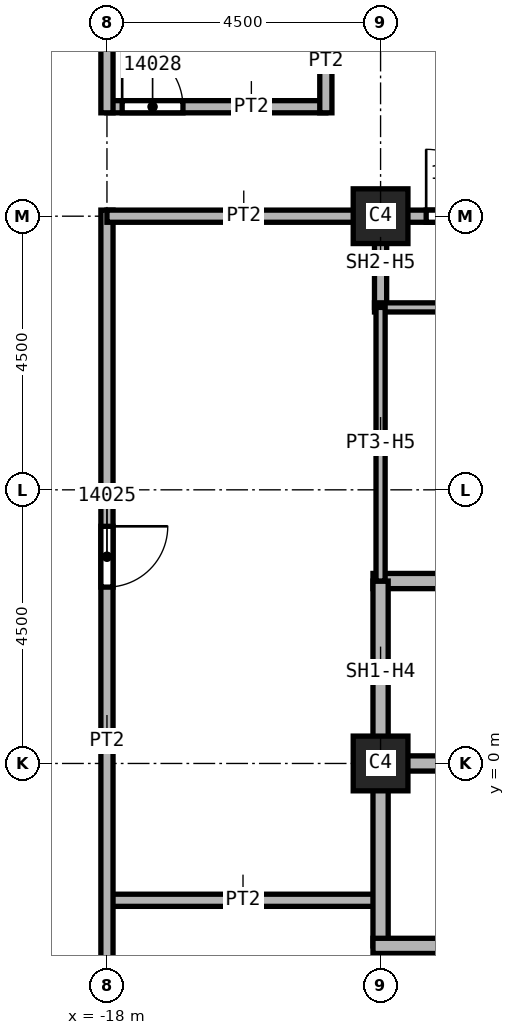
"""IFC4 building model, lengths in metres.
Left out: names, types, materials, properties, quantities, classifications, styles, units other than length and angle.
Written with IfcOpenShell. Run it as: python <this file> out.ifc"""

import sys

from ifc_helpers import new_model, si_unit, direction, frame, frame_2d, origin, origin_2d, place, context, subcontext, project, spatial, rectangle, extrude, element, fill, save


model = new_model("IFC4")
c1 = context("Model", 3, precision=1e-05, world=origin(), true_north=direction((0.0, 1.0)))
c2 = subcontext(c1, "Body", "Model", "MODEL_VIEW")
j1 = project(units=[si_unit("LENGTHUNIT", "METRE"), si_unit("PLANEANGLEUNIT", "RADIAN")], contexts=[c1])
p1 = place(None, origin())
s1 = spatial("IfcSite", under=j1, at=p1, CompositionType="ELEMENT")
p2 = place(p1, origin())
s2 = spatial("IfcBuilding", under=s1, at=p2, CompositionType="ELEMENT")
p3 = place(p2, frame((0.0, 0.0, 220.0)))
s3 = spatial("IfcBuildingStorey", under=s2, at=p3, CompositionType="ELEMENT", Elevation=220.0)
for number, where, z_axis, x_axis in (
    (1, (-13.5, 0.0, 0.0), (0.0, 0.0, 1.0), (1.0, 0.0, 0.0)),
    (2, (-13.5, 9.0, 0.0), (0.0, 0.0, 1.0), (1.0, 0.0, 0.0)),
):
    element("IfcColumn", number, at=place(p3, frame(where, z_axis=z_axis, x_axis=x_axis)), inside=s3, PredefinedType="COLUMN", context=c2, shape_type="SweptSolid", body=[
        extrude(rectangle(XDim=0.9, YDim=0.9, at=origin_2d()), origin(), (0.0, 0.0, 1.0), 3.72),
    ])
p4 = place(p3, frame((-18.0, -2.25, 0.0), z_axis=(0.0, 0.0, 1.0), x_axis=(1.0, 0.0, 0.0)))
e3 = element("IfcWall", 3, at=p4, inside=s3, PredefinedType="PARTITIONING", context=c2, shape_type="SweptSolid", body=[
    extrude(rectangle(XDim=4.5, YDim=0.2, at=frame_2d((2.25, 0.0))), origin(), (0.0, 0.0, 1.0), 3.72),
])
p5 = place(p3, frame((-18.0, 9.1, 0.0), z_axis=(0.0, 0.0, 1.0), x_axis=(0.0, -1.0, 0.0)))
e4 = element("IfcWall", 4, at=p5, inside=s3, PredefinedType="PARTITIONING", context=c2, shape_type="SweptSolid", body=[
    extrude(rectangle(XDim=18.2, YDim=0.2, at=frame_2d((9.1, 0.0))), origin(), (0.0, 0.0, 1.0), 3.72),
])
p6 = place(p5, frame((15.1, 0.0, 0.0)))
e5 = element("IfcOpeningElement", 5, at=p6, cuts=e4, PredefinedType="OPENING", context=c2, shape_type="SweptSolid", body=[
    extrude(rectangle(XDim=1.0, YDim=2.1, at=frame_2d((0.5, 1.05))), frame((0.0, 0.1, 0.0), z_axis=(0.0, -1.0, 0.0), x_axis=(1.0, 0.0, 0.0)), (0.0, 0.0, 1.0), 0.2),
])
p7 = place(p5, frame((5.2, 0.0, 0.0)))
e6 = element("IfcOpeningElement", 6, at=p7, cuts=e4, PredefinedType="OPENING", context=c2, shape_type="SweptSolid", body=[
    extrude(rectangle(XDim=1.0, YDim=2.1, at=frame_2d((0.5, 1.05))), frame((0.0, 0.1, 0.0), z_axis=(0.0, -1.0, 0.0), x_axis=(1.0, 0.0, 0.0)), (0.0, 0.0, 1.0), 0.2),
])
p8 = place(p3, frame((-18.0, 10.8, 0.0), z_axis=(0.0, 0.0, 1.0), x_axis=(1.0, 0.0, 0.0)))
e7 = element("IfcWall", 7, at=p8, inside=s3, PredefinedType="PARTITIONING", context=c2, shape_type="SweptSolid", body=[
    extrude(rectangle(XDim=3.6, YDim=0.2, at=frame_2d((1.8, 0.0))), origin(), (0.0, 0.0, 1.0), 3.72),
])
p9 = place(p8, frame((0.25, 0.0, 0.0)))
e8 = element("IfcOpeningElement", 8, at=p9, cuts=e7, PredefinedType="OPENING", context=c2, shape_type="SweptSolid", body=[
    extrude(rectangle(XDim=1.0, YDim=2.1, at=frame_2d((0.5, 1.05))), frame((0.0, 0.1, 0.0), z_axis=(0.0, -1.0, 0.0), x_axis=(1.0, 0.0, 0.0)), (0.0, 0.0, 1.0), 0.2),
])
p10 = place(p3, frame((-18.0, 13.6, 0.0), z_axis=(0.0, 0.0, 1.0), x_axis=(0.0, -1.0, 0.0)))
e9 = element("IfcWall", 9, at=p10, inside=s3, PredefinedType="PARTITIONING", context=c2, shape_type="SweptSolid", body=[
    extrude(rectangle(XDim=2.9, YDim=0.2, at=frame_2d((1.45, 0.0))), origin(), (0.0, 0.0, 1.0), 3.72),
])
p11 = place(p3, frame((-13.5, 9.0, 0.0), z_axis=(0.0, 0.0, 1.0), x_axis=(-1.0, 0.0, 0.0)))
e10 = element("IfcWall", 10, at=p11, inside=s3, PredefinedType="PARTITIONING", context=c2, shape_type="SweptSolid", body=[
    extrude(rectangle(XDim=4.5, YDim=0.2, at=frame_2d((2.25, 0.0))), origin(), (0.0, 0.0, 1.0), 3.72),
])
p12 = place(p3, frame((-14.4, 10.7, 0.0), z_axis=(0.0, 0.0, 1.0), x_axis=(0.0, 1.0, 0.0)))
e11 = element("IfcWall", 11, at=p12, inside=s3, PredefinedType="PARTITIONING", context=c2, shape_type="SweptSolid", body=[
    extrude(rectangle(XDim=1.6, YDim=0.2, at=frame_2d((0.8, 0.0))), origin(), (0.0, 0.0, 1.0), 3.72),
])
p13 = place(p3, frame((-13.6, 9.0, 0.0), z_axis=(0.0, 0.0, 1.0), x_axis=(1.0, 0.0, 0.0)))
e12 = element("IfcWall", 12, at=p13, inside=s3, PredefinedType="SOLIDWALL", context=c2, shape_type="SweptSolid", body=[
    extrude(rectangle(XDim=3.1, YDim=0.2, at=frame_2d((1.55, 0.0))), origin(), (0.0, 0.0, 1.0), 2.958),
])
p14 = place(p13, frame((0.85, 0.0, 0.0)))
e13 = element("IfcOpeningElement", 13, at=p14, cuts=e12, PredefinedType="OPENING", context=c2, shape_type="SweptSolid", body=[
    extrude(rectangle(XDim=1.1, YDim=2.1, at=frame_2d((0.55, 1.05))), frame((0.0, 0.1, 0.0), z_axis=(0.0, -1.0, 0.0), x_axis=(1.0, 0.0, 0.0)), (0.0, 0.0, 1.0), 0.2),
])
p15 = place(p3, frame((-13.5, -4.5, 0.0), z_axis=(0.0, 0.0, 1.0), x_axis=(0.0, 1.0, 0.0)))
e14 = element("IfcWall", 14, at=p15, inside=s3, PredefinedType="SOLIDWALL", context=c2, shape_type="SweptSolid", body=[
    extrude(rectangle(XDim=1.5, YDim=0.2, at=frame_2d((0.75, 0.0))), origin(), (0.0, 0.0, 1.0), 2.958),
])
p16 = place(p3, frame((-13.5, 7.5, 0.0), z_axis=(0.0, 0.0, 1.0), x_axis=(0.0, 1.0, 0.0)))
e15 = element("IfcWall", 15, at=p16, inside=s3, PredefinedType="SOLIDWALL", context=c2, shape_type="SweptSolid", body=[
    extrude(rectangle(XDim=1.6, YDim=0.2, at=frame_2d((0.8, 0.0))), origin(), (0.0, 0.0, 1.0), 2.958),
])
p17 = place(p3, frame((-13.625, 0.0, 0.0), z_axis=(0.0, 0.0, 1.0), x_axis=(1.0, 0.0, 0.0)))
e16 = element("IfcWall", 16, at=p17, inside=s3, PredefinedType="SOLIDWALL", context=c2, shape_type="SweptSolid", body=[
    extrude(rectangle(XDim=3.125, YDim=0.25, at=frame_2d((1.562, 0.0))), origin(), (0.0, 0.0, 1.0), 3.72),
])
p18 = place(p3, frame((-13.625, 3.0, 0.0), z_axis=(0.0, 0.0, 1.0), x_axis=(1.0, 0.0, 0.0)))
e17 = element("IfcWall", 17, at=p18, inside=s3, PredefinedType="SOLIDWALL", context=c2, shape_type="SweptSolid", body=[
    extrude(rectangle(XDim=9.25, YDim=0.25, at=frame_2d((4.625, 0.0))), origin(), (0.0, 0.0, 1.0), 3.72),
])
p19 = place(p18, frame((3.25, 0.0, 0.0)))
e18 = element("IfcOpeningElement", 18, at=p19, cuts=e17, PredefinedType="OPENING", context=c2, shape_type="SweptSolid", body=[
    extrude(rectangle(XDim=1.1, YDim=2.1, at=frame_2d((0.55, 1.05))), frame((0.0, 0.125, 0.0), z_axis=(0.0, -1.0, 0.0), x_axis=(1.0, 0.0, 0.0)), (0.0, 0.0, 1.0), 0.25),
])
p20 = place(p3, frame((-13.5, -3.0, 0.0), z_axis=(0.0, 0.0, 1.0), x_axis=(0.0, 1.0, 0.0)))
e19 = element("IfcWall", 19, at=p20, inside=s3, PredefinedType="SOLIDWALL", context=c2, shape_type="SweptSolid", body=[
    extrude(rectangle(XDim=6.0, YDim=0.25, at=frame_2d((3.0, 0.0))), origin(), (0.0, 0.0, 1.0), 2.958),
])
p21 = place(p3, frame((-13.625, -3.0, 0.0), z_axis=(0.0, 0.0, 1.0), x_axis=(1.0, 0.0, 0.0)))
e20 = element("IfcWall", 20, at=p21, inside=s3, PredefinedType="SOLIDWALL", context=c2, shape_type="SweptSolid", body=[
    extrude(rectangle(XDim=6.125, YDim=0.25, at=frame_2d((3.062, 0.0))), origin(), (0.0, 0.0, 1.0), 3.72),
])
p22 = place(p21, frame((3.25, 0.0, 0.0)))
e21 = element("IfcOpeningElement", 21, at=p22, cuts=e20, PredefinedType="OPENING", context=c2, shape_type="SweptSolid", body=[
    extrude(rectangle(XDim=1.1, YDim=2.1, at=frame_2d((0.55, 1.05))), frame((0.0, 0.125, 0.0), z_axis=(0.0, -1.0, 0.0), x_axis=(1.0, 0.0, 0.0)), (0.0, 0.0, 1.0), 0.25),
])
p23 = place(p3, frame((-13.6, 7.5, 0.0), z_axis=(0.0, 0.0, 1.0), x_axis=(1.0, 0.0, 0.0)))
e22 = element("IfcWall", 22, at=p23, inside=s3, PredefinedType="PARTITIONING", context=c2, shape_type="SweptSolid", body=[
    extrude(rectangle(XDim=3.1, YDim=0.15, at=frame_2d((1.55, 0.0))), origin(), (0.0, 0.0, 1.0), 3.72),
])
p24 = place(p3, frame((-13.5, 3.0, 0.0), z_axis=(0.0, 0.0, 1.0), x_axis=(0.0, 1.0, 0.0)))
e23 = element("IfcWall", 23, at=p24, inside=s3, PredefinedType="PARTITIONING", context=c2, shape_type="SweptSolid", body=[
    extrude(rectangle(XDim=4.5, YDim=0.15, at=frame_2d((2.25, 0.0))), origin(), (0.0, 0.0, 1.0), 2.958),
])
p25 = place(p14, origin())
e24 = element("IfcDoor", 24, at=p25, inside=s3, OperationType="SINGLE_SWING_RIGHT", PredefinedType="DOOR", context=c2, shape_type="SweptSolid", body=[
    extrude(rectangle(XDim=1.1, YDim=2.1, at=frame_2d((0.55, 1.05))), frame((0.0, 0.025, 0.0), z_axis=(0.0, -1.0, 0.0), x_axis=(1.0, 0.0, 0.0)), (0.0, 0.0, 1.0), 0.05),
])
fill(e13, e24)
p26 = place(p7, origin())
e25 = element("IfcDoor", 25, at=p26, inside=s3, OperationType="SINGLE_SWING_RIGHT", PredefinedType="DOOR", context=c2, shape_type="SweptSolid", body=[
    extrude(rectangle(XDim=1.0, YDim=2.1, at=frame_2d((0.5, 1.05))), frame((0.0, 0.025, 0.0), z_axis=(0.0, -1.0, 0.0), x_axis=(1.0, 0.0, 0.0)), (0.0, 0.0, 1.0), 0.05),
])
fill(e6, e25)
p27 = place(p9, origin())
e26 = element("IfcDoor", 26, at=p27, inside=s3, OperationType="SINGLE_SWING_LEFT", PredefinedType="DOOR", context=c2, shape_type="SweptSolid", body=[
    extrude(rectangle(XDim=1.0, YDim=2.1, at=frame_2d((0.5, 1.05))), frame((0.0, 0.025, 0.0), z_axis=(0.0, -1.0, 0.0), x_axis=(1.0, 0.0, 0.0)), (0.0, 0.0, 1.0), 0.05),
])
fill(e8, e26)
save(model, sys.argv[1])
